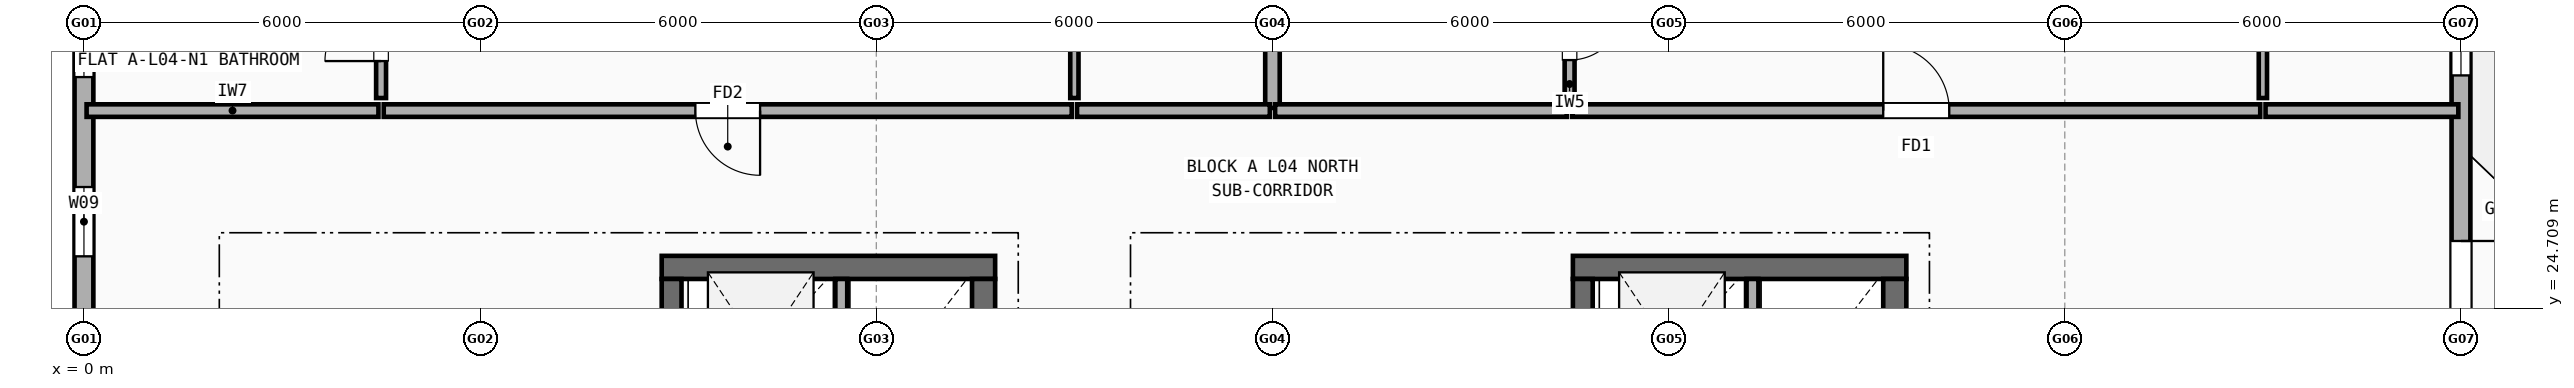
"""IFC4 building model, lengths in metres.
Left out: names, types, materials, properties, quantities, classifications, styles, units other than length and angle.
Written with IfcOpenShell. Run it as: python <this file> out.ifc"""

import sys

from ifc_helpers import new_model, si_unit, direction, frame, frame_2d, origin, place, context, subcontext, project, spatial, rectangle, extrude, element, fill, save


model = new_model("IFC4")
c1 = context("Model", 3, precision=1e-05, world=origin(), true_north=direction((0.0, 1.0)))
c2 = subcontext(c1, "Body", "Model", "MODEL_VIEW")
j1 = project(units=[si_unit("LENGTHUNIT", "METRE"), si_unit("PLANEANGLEUNIT", "RADIAN")], contexts=[c1])
p1 = place(None, origin())
s1 = spatial("IfcSite", under=j1, at=p1, CompositionType="ELEMENT")
p2 = place(p1, origin())
s2 = spatial("IfcBuilding", under=s1, at=p2, CompositionType="ELEMENT")
p3 = place(p2, frame((0.0, 0.0, 14.1)))
s3 = spatial("IfcBuildingStorey", under=s2, at=p3, CompositionType="ELEMENT", Elevation=14.1)
p4 = place(p3, frame((36.0, 24.375, 0.0), z_axis=(0.0, 0.0, 1.0), x_axis=(0.0, 1.0, 0.0)))
e1 = element("IfcWall", 1, at=p4, inside=s3, PredefinedType="STANDARD", context=c2, shape_type="SweptSolid", body=[
    extrude(rectangle(XDim=5.25, YDim=0.285, at=frame_2d((2.625, 0.0))), origin(), (0.0, 0.0, 1.0), 2.432),
])
p5 = place(p4, frame((0.2, 0.0, 0.0)))
e2 = element("IfcOpeningElement", 2, at=p5, cuts=e1, PredefinedType="OPENING", context=c2, shape_type="SweptSolid", body=[
    extrude(rectangle(XDim=1.15, YDim=2.15, at=frame_2d((0.575, 1.075))), frame((0.0, 0.152, 0.0), z_axis=(0.0, -1.0, 0.0), x_axis=(1.0, 0.0, 0.0)), (0.0, 0.0, 1.0), 0.305),
])
p6 = place(p4, frame((3.857, 0.0, 0.9)))
e3 = element("IfcOpeningElement", 3, at=p6, cuts=e1, PredefinedType="OPENING", context=c2, shape_type="SweptSolid", body=[
    extrude(rectangle(XDim=0.9, YDim=1.3, at=frame_2d((0.45, 0.65))), frame((0.0, 0.152, 0.0), z_axis=(0.0, -1.0, 0.0), x_axis=(1.0, 0.0, 0.0)), (0.0, 0.0, 1.0), 0.305),
])
p7 = place(p3, frame((0.0, 29.625, 0.0), z_axis=(0.0, 0.0, 1.0), x_axis=(0.0, -1.0, 0.0)))
e4 = element("IfcWall", 4, at=p7, inside=s3, PredefinedType="STANDARD", context=c2, shape_type="SweptSolid", body=[
    extrude(rectangle(XDim=5.25, YDim=0.285, at=frame_2d((2.625, 0.0))), origin(), (0.0, 0.0, 1.0), 2.432),
])
p8 = place(p7, frame((0.468, 0.0, 0.9)))
e5 = element("IfcOpeningElement", 5, at=p8, cuts=e4, PredefinedType="OPENING", context=c2, shape_type="SweptSolid", body=[
    extrude(rectangle(XDim=0.95, YDim=1.35, at=frame_2d((0.475, 0.675))), frame((0.0, 0.152, 0.0), z_axis=(0.0, -1.0, 0.0), x_axis=(1.0, 0.0, 0.0)), (0.0, 0.0, 1.0), 0.305),
])
p9 = place(p7, frame((3.083, 0.0, 0.9)))
e6 = element("IfcOpeningElement", 6, at=p9, cuts=e4, PredefinedType="OPENING", context=c2, shape_type="SweptSolid", body=[
    extrude(rectangle(XDim=1.05, YDim=1.35, at=frame_2d((0.525, 0.675))), frame((0.0, 0.152, 0.0), z_axis=(0.0, -1.0, 0.0), x_axis=(1.0, 0.0, 0.0)), (0.0, 0.0, 1.0), 0.305),
])
p10 = place(p3, frame((13.8, 25.325, 0.0), z_axis=(0.0, 0.0, 1.0), x_axis=(-1.0, 0.0, 0.0)))
e7 = element("IfcWall", 7, at=p10, inside=s3, PredefinedType="SHEAR", context=c2, shape_type="SweptSolid", body=[
    extrude(rectangle(XDim=5.05, YDim=0.35, at=frame_2d((2.525, 0.0))), origin(), (0.0, 0.0, 1.0), 2.95),
])
p11 = place(p3, frame((13.625, 18.75, 0.0), z_axis=(0.0, 0.0, 1.0), x_axis=(0.0, 1.0, 0.0)))
e8 = element("IfcWall", 8, at=p11, inside=s3, PredefinedType="SHEAR", context=c2, shape_type="SweptSolid", body=[
    extrude(rectangle(XDim=6.4, YDim=0.35, at=frame_2d((3.2, 0.0))), origin(), (0.0, 0.0, 1.0), 2.95),
])
p12 = place(p3, frame((8.9, 21.8, 0.0), z_axis=(0.0, 0.0, 1.0), x_axis=(0.0, 1.0, 0.0)))
e9 = element("IfcWall", 9, at=p12, inside=s3, PredefinedType="SHEAR", context=c2, shape_type="SweptSolid", body=[
    extrude(rectangle(XDim=3.35, YDim=0.3, at=frame_2d((1.675, 0.0))), origin(), (0.0, 0.0, 1.0), 2.95),
])
p13 = place(p3, frame((11.47, 22.94, 0.0), z_axis=(0.0, 0.0, 1.0), x_axis=(0.0, 1.0, 0.0)))
e10 = element("IfcWall", 10, at=p13, inside=s3, PredefinedType="SOLIDWALL", context=c2, shape_type="SweptSolid", body=[
    extrude(rectangle(XDim=2.21, YDim=0.18, at=frame_2d((1.105, 0.0))), origin(), (0.0, 0.0, 1.0), 2.95),
])
p14 = place(p3, frame((27.6, 25.325, 0.0), z_axis=(0.0, 0.0, 1.0), x_axis=(-1.0, 0.0, 0.0)))
e11 = element("IfcWall", 11, at=p14, inside=s3, PredefinedType="SHEAR", context=c2, shape_type="SweptSolid", body=[
    extrude(rectangle(XDim=5.05, YDim=0.35, at=frame_2d((2.525, 0.0))), origin(), (0.0, 0.0, 1.0), 2.95),
])
p15 = place(p3, frame((27.425, 18.75, 0.0), z_axis=(0.0, 0.0, 1.0), x_axis=(0.0, 1.0, 0.0)))
e12 = element("IfcWall", 12, at=p15, inside=s3, PredefinedType="SHEAR", context=c2, shape_type="SweptSolid", body=[
    extrude(rectangle(XDim=6.4, YDim=0.35, at=frame_2d((3.2, 0.0))), origin(), (0.0, 0.0, 1.0), 2.95),
])
p16 = place(p3, frame((22.7, 21.8, 0.0), z_axis=(0.0, 0.0, 1.0), x_axis=(0.0, 1.0, 0.0)))
e13 = element("IfcWall", 13, at=p16, inside=s3, PredefinedType="SHEAR", context=c2, shape_type="SweptSolid", body=[
    extrude(rectangle(XDim=3.35, YDim=0.3, at=frame_2d((1.675, 0.0))), origin(), (0.0, 0.0, 1.0), 2.95),
])
p17 = place(p3, frame((25.27, 22.94, 0.0), z_axis=(0.0, 0.0, 1.0), x_axis=(0.0, 1.0, 0.0)))
e14 = element("IfcWall", 14, at=p17, inside=s3, PredefinedType="SOLIDWALL", context=c2, shape_type="SweptSolid", body=[
    extrude(rectangle(XDim=2.21, YDim=0.18, at=frame_2d((1.105, 0.0))), origin(), (0.0, 0.0, 1.0), 2.95),
])
p18 = place(p3, frame((18.0, 27.74, 0.0), z_axis=(0.0, 0.0, 1.0), x_axis=(0.0, 1.0, 0.0)))
e15 = element("IfcWall", 15, at=p18, inside=s3, PredefinedType="SOLIDWALL", context=c2, shape_type="SweptSolid", body=[
    extrude(rectangle(XDim=13.87, YDim=0.22, at=frame_2d((6.935, 0.0))), origin(), (0.0, 0.0, 1.0), 2.458),
])
p19 = place(p3, frame((0.04, 27.7, 0.0), z_axis=(0.0, 0.0, 1.0), x_axis=(1.0, 0.0, 0.0)))
e16 = element("IfcWall", 16, at=p19, inside=s3, PredefinedType="SOLIDWALL", context=c2, shape_type="SweptSolid", body=[
    extrude(rectangle(XDim=4.42, YDim=0.19, at=frame_2d((2.21, 0.0))), origin(), (0.0, 0.0, 1.0), 2.432),
])
p20 = place(p3, frame((4.54, 27.7, 0.0), z_axis=(0.0, 0.0, 1.0), x_axis=(1.0, 0.0, 0.0)))
e17 = element("IfcWall", 17, at=p20, inside=s3, PredefinedType="SOLIDWALL", context=c2, shape_type="SweptSolid", body=[
    extrude(rectangle(XDim=10.42, YDim=0.19, at=frame_2d((5.21, 0.0))), origin(), (0.0, 0.0, 1.0), 2.508),
])
p21 = place(p20, frame((4.72, 0.0, 0.0)))
e18 = element("IfcOpeningElement", 18, at=p21, cuts=e17, PredefinedType="OPENING", context=c2, shape_type="SweptSolid", body=[
    extrude(rectangle(XDim=0.98, YDim=2.15, at=frame_2d((0.49, 1.075))), frame((0.0, 0.105, 0.0), z_axis=(0.0, -1.0, 0.0), x_axis=(1.0, 0.0, 0.0)), (0.0, 0.0, 1.0), 0.21),
])
p22 = place(p3, frame((4.5, 27.89, 0.0), z_axis=(0.0, 0.0, 1.0), x_axis=(0.0, 1.0, 0.0)))
e19 = element("IfcWall", 19, at=p22, inside=s3, PredefinedType="PARTITIONING", context=c2, shape_type="SweptSolid", body=[
    extrude(rectangle(XDim=1.97, YDim=0.15, at=frame_2d((0.985, 0.0))), origin(), (0.0, 0.0, 1.0), 2.95),
])
p23 = place(p22, frame((0.56, 0.0, 0.0)))
e20 = element("IfcOpeningElement", 20, at=p23, cuts=e19, PredefinedType="OPENING", context=c2, shape_type="SweptSolid", body=[
    extrude(rectangle(XDim=0.85, YDim=2.1, at=frame_2d((0.425, 1.05))), frame((0.0, 0.085, 0.0), z_axis=(0.0, -1.0, 0.0), x_axis=(1.0, 0.0, 0.0)), (0.0, 0.0, 1.0), 0.17),
])
p24 = place(p3, frame((15.04, 27.7, 0.0), z_axis=(0.0, 0.0, 1.0), x_axis=(1.0, 0.0, 0.0)))
e21 = element("IfcWall", 21, at=p24, inside=s3, PredefinedType="SOLIDWALL", context=c2, shape_type="SweptSolid", body=[
    extrude(rectangle(XDim=2.92, YDim=0.19, at=frame_2d((1.46, 0.0))), origin(), (0.0, 0.0, 1.0), 2.95),
])
p25 = place(p3, frame((15.0, 27.89, 0.0), z_axis=(0.0, 0.0, 1.0), x_axis=(0.0, 1.0, 0.0)))
e22 = element("IfcWall", 22, at=p25, inside=s3, PredefinedType="PARTITIONING", context=c2, shape_type="SweptSolid", body=[
    extrude(rectangle(XDim=13.92, YDim=0.125, at=frame_2d((6.96, 0.0))), origin(), (0.0, 0.0, 1.0), 2.432),
])
p26 = place(p25, frame((6.65, 0.0, 0.0)))
e23 = element("IfcOpeningElement", 23, at=p26, cuts=e22, PredefinedType="OPENING", context=c2, shape_type="SweptSolid", body=[
    extrude(rectangle(XDim=0.9, YDim=2.1, at=frame_2d((0.45, 1.05))), frame((0.0, 0.073, 0.0), z_axis=(0.0, -1.0, 0.0), x_axis=(1.0, 0.0, 0.0)), (0.0, 0.0, 1.0), 0.145),
])
p27 = place(p3, frame((18.04, 27.7, 0.0), z_axis=(0.0, 0.0, 1.0), x_axis=(1.0, 0.0, 0.0)))
e24 = element("IfcWall", 24, at=p27, inside=s3, PredefinedType="SOLIDWALL", context=c2, shape_type="SweptSolid", body=[
    extrude(rectangle(XDim=4.42, YDim=0.19, at=frame_2d((2.21, 0.0))), origin(), (0.0, 0.0, 1.0), 2.95),
])
p28 = place(p3, frame((22.54, 27.7, 0.0), z_axis=(0.0, 0.0, 1.0), x_axis=(1.0, 0.0, 0.0)))
e25 = element("IfcWall", 25, at=p28, inside=s3, PredefinedType="SOLIDWALL", context=c2, shape_type="SweptSolid", body=[
    extrude(rectangle(XDim=10.42, YDim=0.19, at=frame_2d((5.21, 0.0))), origin(), (0.0, 0.0, 1.0), 2.432),
])
p29 = place(p28, frame((4.71, 0.0, 0.0)))
e26 = element("IfcOpeningElement", 26, at=p29, cuts=e25, PredefinedType="OPENING", context=c2, shape_type="SweptSolid", body=[
    extrude(rectangle(XDim=1.0, YDim=2.15, at=frame_2d((0.5, 1.075))), frame((0.0, 0.105, 0.0), z_axis=(0.0, -1.0, 0.0), x_axis=(1.0, 0.0, 0.0)), (0.0, 0.0, 1.0), 0.21),
])
p30 = place(p3, frame((22.5, 27.89, 0.0), z_axis=(0.0, 0.0, 1.0), x_axis=(0.0, 1.0, 0.0)))
e27 = element("IfcWall", 27, at=p30, inside=s3, PredefinedType="PARTITIONING", context=c2, shape_type="SweptSolid", body=[
    extrude(rectangle(XDim=1.97, YDim=0.15, at=frame_2d((0.985, 0.0))), origin(), (0.0, 0.0, 1.0), 2.95),
])
p31 = place(p30, frame((0.575, 0.0, 0.0)))
e28 = element("IfcOpeningElement", 28, at=p31, cuts=e27, PredefinedType="OPENING", context=c2, shape_type="SweptSolid", body=[
    extrude(rectangle(XDim=0.82, YDim=2.08, at=frame_2d((0.41, 1.04))), frame((0.0, 0.085, 0.0), z_axis=(0.0, -1.0, 0.0), x_axis=(1.0, 0.0, 0.0)), (0.0, 0.0, 1.0), 0.17),
])
p32 = place(p3, frame((33.04, 27.7, 0.0), z_axis=(0.0, 0.0, 1.0), x_axis=(1.0, 0.0, 0.0)))
e29 = element("IfcWall", 29, at=p32, inside=s3, PredefinedType="SOLIDWALL", context=c2, shape_type="SweptSolid", body=[
    extrude(rectangle(XDim=2.92, YDim=0.19, at=frame_2d((1.46, 0.0))), origin(), (0.0, 0.0, 1.0), 2.432),
])
p33 = place(p3, frame((33.0, 27.89, 0.0), z_axis=(0.0, 0.0, 1.0), x_axis=(0.0, 1.0, 0.0)))
e30 = element("IfcWall", 30, at=p33, inside=s3, PredefinedType="PARTITIONING", context=c2, shape_type="SweptSolid", body=[
    extrude(rectangle(XDim=13.92, YDim=0.125, at=frame_2d((6.96, 0.0))), origin(), (0.0, 0.0, 1.0), 2.432),
])
p34 = place(p33, frame((6.65, 0.0, 0.0)))
e31 = element("IfcOpeningElement", 31, at=p34, cuts=e30, PredefinedType="OPENING", context=c2, shape_type="SweptSolid", body=[
    extrude(rectangle(XDim=0.88, YDim=2.1, at=frame_2d((0.44, 1.05))), frame((0.0, 0.073, 0.0), z_axis=(0.0, -1.0, 0.0), x_axis=(1.0, 0.0, 0.0)), (0.0, 0.0, 1.0), 0.145),
])
p35 = place(p5, frame((1.15, 0.0, 0.0), z_axis=(0.0, 0.0, 1.0), x_axis=(-1.0, 0.0, 0.0)))
e32 = element("IfcDoor", 32, at=p35, inside=s3, OperationType="SINGLE_SWING_RIGHT", PredefinedType="DOOR", context=c2, shape_type="SweptSolid", body=[
    extrude(rectangle(XDim=1.15, YDim=2.15, at=frame_2d((0.575, 1.075))), frame((0.0, 0.025, 0.0), z_axis=(0.0, -1.0, 0.0), x_axis=(1.0, 0.0, 0.0)), (0.0, 0.0, 1.0), 0.05),
])
fill(e2, e32)
p36 = place(p6, origin())
e33 = element("IfcWindow", 33, at=p36, inside=s3, PartitioningType="SINGLE_PANEL", PredefinedType="WINDOW", context=c2, shape_type="SweptSolid", body=[
    extrude(rectangle(XDim=0.9, YDim=1.3, at=frame_2d((0.45, 0.65))), frame((0.0, 0.03, 0.0), z_axis=(0.0, -1.0, 0.0), x_axis=(1.0, 0.0, 0.0)), (0.0, 0.0, 1.0), 0.06),
])
fill(e3, e33)
p37 = place(p8, origin())
e34 = element("IfcWindow", 34, at=p37, inside=s3, PartitioningType="SINGLE_PANEL", PredefinedType="WINDOW", context=c2, shape_type="SweptSolid", body=[
    extrude(rectangle(XDim=0.95, YDim=1.35, at=frame_2d((0.475, 0.675))), frame((0.0, 0.03, 0.0), z_axis=(0.0, -1.0, 0.0), x_axis=(1.0, 0.0, 0.0)), (0.0, 0.0, 1.0), 0.06),
])
fill(e5, e34)
p38 = place(p9, origin())
e35 = element("IfcWindow", 35, at=p38, inside=s3, PartitioningType="SINGLE_PANEL", PredefinedType="WINDOW", context=c2, shape_type="SweptSolid", body=[
    extrude(rectangle(XDim=1.05, YDim=1.35, at=frame_2d((0.525, 0.675))), frame((0.0, 0.03, 0.0), z_axis=(0.0, -1.0, 0.0), x_axis=(1.0, 0.0, 0.0)), (0.0, 0.0, 1.0), 0.06),
])
fill(e6, e35)
p39 = place(p21, origin())
e36 = element("IfcDoor", 36, at=p39, inside=s3, OperationType="SINGLE_SWING_RIGHT", PredefinedType="DOOR", context=c2, shape_type="SweptSolid", body=[
    extrude(rectangle(XDim=0.98, YDim=2.15, at=frame_2d((0.49, 1.075))), frame((0.0, 0.025, 0.0), z_axis=(0.0, -1.0, 0.0), x_axis=(1.0, 0.0, 0.0)), (0.0, 0.0, 1.0), 0.05),
])
fill(e18, e36)
p40 = place(p23, origin())
e37 = element("IfcDoor", 37, at=p40, inside=s3, OperationType="SINGLE_SWING_LEFT", PredefinedType="DOOR", context=c2, shape_type="SweptSolid", body=[
    extrude(rectangle(XDim=0.85, YDim=2.1, at=frame_2d((0.425, 1.05))), frame((0.0, 0.025, 0.0), z_axis=(0.0, -1.0, 0.0), x_axis=(1.0, 0.0, 0.0)), (0.0, 0.0, 1.0), 0.05),
])
fill(e20, e37)
p41 = place(p29, origin())
e38 = element("IfcDoor", 38, at=p41, inside=s3, OperationType="SINGLE_SWING_LEFT", PredefinedType="DOOR", context=c2, shape_type="SweptSolid", body=[
    extrude(rectangle(XDim=1.0, YDim=2.15, at=frame_2d((0.5, 1.075))), frame((0.0, 0.025, 0.0), z_axis=(0.0, -1.0, 0.0), x_axis=(1.0, 0.0, 0.0)), (0.0, 0.0, 1.0), 0.05),
])
fill(e26, e38)
p42 = place(p31, origin())
e39 = element("IfcDoor", 39, at=p42, inside=s3, OperationType="SINGLE_SWING_RIGHT", PredefinedType="DOOR", context=c2, shape_type="SweptSolid", body=[
    extrude(rectangle(XDim=0.82, YDim=2.08, at=frame_2d((0.41, 1.04))), frame((0.0, 0.025, 0.0), z_axis=(0.0, -1.0, 0.0), x_axis=(1.0, 0.0, 0.0)), (0.0, 0.0, 1.0), 0.05),
])
fill(e28, e39)
save(model, sys.argv[1])
